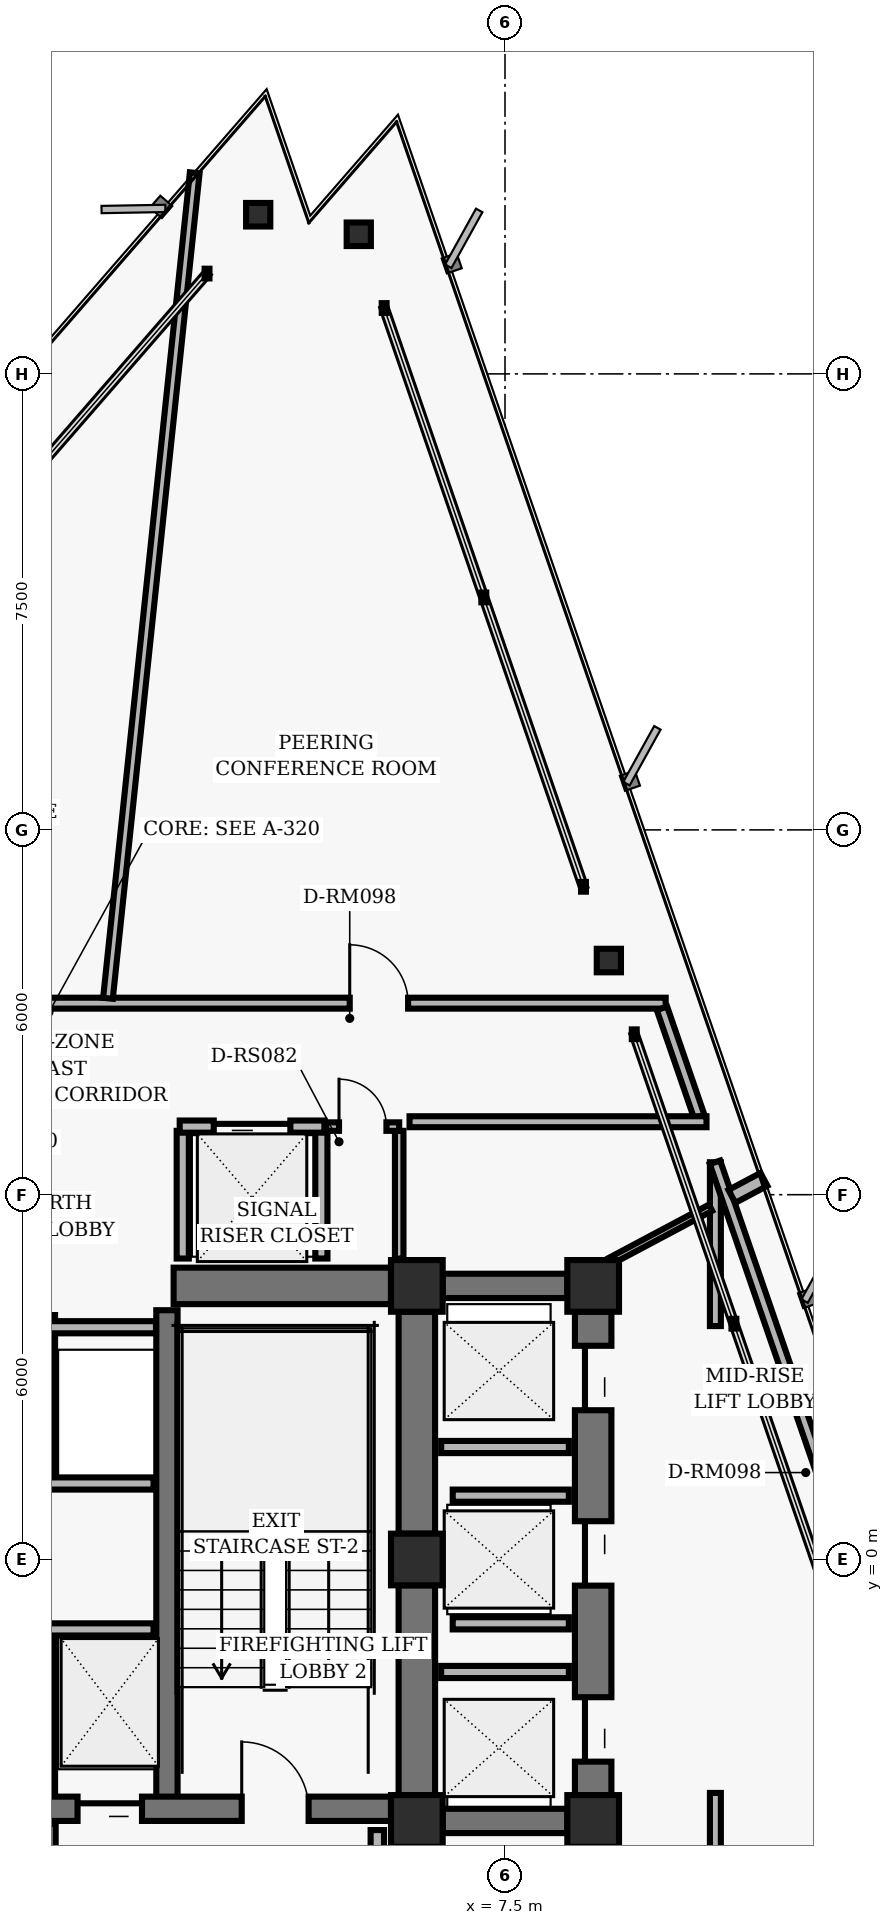
"""IFC4 building model, lengths in metres.
Left out: names, types, materials, properties, quantities, classifications, styles, units other than length and angle.
Written with IfcOpenShell. Run it as: python <this file> out.ifc"""

import sys

from ifc_helpers import new_model, si_unit, direction, frame, frame_2d, origin, origin_2d, place, context, subcontext, project, spatial, rectangle, hollow_rectangle, i_section, extrude, element, fill, save


model = new_model("IFC4")
c1 = context("Model", 3, precision=1e-05, world=origin(), true_north=direction((0.0, 1.0)))
c2 = subcontext(c1, "Body", "Model", "MODEL_VIEW")
j1 = project(units=[si_unit("LENGTHUNIT", "METRE"), si_unit("PLANEANGLEUNIT", "RADIAN")], contexts=[c1])
p1 = place(None, origin())
s1 = spatial("IfcSite", under=j1, at=p1, CompositionType="ELEMENT")
p2 = place(p1, origin())
s2 = spatial("IfcBuilding", under=s1, at=p2, CompositionType="ELEMENT")
p3 = place(p2, frame((0.0, 0.0, 162.4)))
s3 = spatial("IfcBuildingStorey", under=s2, at=p3, CompositionType="ELEMENT", Elevation=162.4)
for number, where, z_axis, x_axis in (
    (1, (6.05, 4.5, 0.0), (0.0, 0.0, 1.0), (1.0, 0.0, 0.0)),
    (2, (6.05, 0.0, 0.0), (0.0, 0.0, 1.0), (1.0, 0.0, 0.0)),
    (3, (6.05, -4.3, 0.0), (0.0, 0.0, 1.0), (1.0, 0.0, 0.0)),
    (4, (8.95, 4.5, 0.0), (0.0, 0.0, 1.0), (1.0, 0.0, 0.0)),
    (5, (8.95, -4.3, 0.0), (0.0, 0.0, 1.0), (1.0, 0.0, 0.0)),
):
    element("IfcColumn", number, at=place(p3, frame(where, z_axis=z_axis, x_axis=x_axis)), inside=s3, PredefinedType="COLUMN", context=c2, shape_type="SweptSolid", body=[
        extrude(hollow_rectangle(XDim=0.85, YDim=0.85, WallThickness=0.055, InnerFilletRadius=0.02, OuterFilletRadius=0.04, at=origin_2d()), origin(), (0.0, 0.0, 1.0), 3.04),
    ])
p4 = place(p3, frame((6.05, 0.425, 0.0), z_axis=(0.0, 0.0, 1.0), x_axis=(0.0, 1.0, 0.0)))
e6 = element("IfcWall", 6, at=p4, inside=s3, PredefinedType="SHEAR", context=c2, shape_type="SweptSolid", body=[
    extrude(rectangle(XDim=3.65, YDim=0.6, at=frame_2d((1.825, 0.0))), origin(), (0.0, 0.0, 1.0), 2.788),
])
p5 = place(p3, frame((6.05, -3.875, 0.0), z_axis=(0.0, 0.0, 1.0), x_axis=(0.0, 1.0, 0.0)))
e7 = element("IfcWall", 7, at=p5, inside=s3, PredefinedType="SHEAR", context=c2, shape_type="SweptSolid", body=[
    extrude(rectangle(XDim=3.45, YDim=0.6, at=frame_2d((1.725, 0.0))), origin(), (0.0, 0.0, 1.0), 2.788),
])
p6 = place(p3, frame((1.94, -4.1, 0.0), z_axis=(0.0, 0.0, 1.0), x_axis=(0.0, 1.0, 0.0)))
e8 = element("IfcWall", 8, at=p6, inside=s3, PredefinedType="SHEAR", context=c2, shape_type="SweptSolid", body=[
    extrude(rectangle(XDim=8.2, YDim=0.35, at=frame_2d((4.1, 0.0))), origin(), (0.0, 0.0, 1.0), 2.788),
])
p7 = place(p3, frame((-5.625, -4.1, 0.0), z_axis=(0.0, 0.0, 1.0), x_axis=(1.0, 0.0, 0.0)))
e9 = element("IfcWall", 9, at=p7, inside=s3, PredefinedType="SHEAR", context=c2, shape_type="SweptSolid", body=[
    extrude(rectangle(XDim=11.25, YDim=0.4, at=frame_2d((5.625, 0.0))), origin(), (0.0, 0.0, 1.0), 2.788),
])
p8 = place(p7, frame((1.355, 0.0, 0.0)))
e10 = element("IfcOpeningElement", 10, at=p8, cuts=e9, PredefinedType="OPENING", context=c2, shape_type="SweptSolid", body=[
    extrude(rectangle(XDim=1.1, YDim=2.04, at=frame_2d((0.55, 1.02))), frame((0.0, 0.21, 0.0), z_axis=(0.0, -1.0, 0.0), x_axis=(1.0, 0.0, 0.0)), (0.0, 0.0, 1.0), 0.42),
])
p9 = place(p7, frame((8.795, 0.0, 0.0)))
e11 = element("IfcOpeningElement", 11, at=p9, cuts=e9, PredefinedType="OPENING", context=c2, shape_type="SweptSolid", body=[
    extrude(rectangle(XDim=1.1, YDim=2.04, at=frame_2d((0.55, 1.02))), frame((0.0, 0.21, 0.0), z_axis=(0.0, -1.0, 0.0), x_axis=(1.0, 0.0, 0.0)), (0.0, 0.0, 1.0), 0.42),
])
p10 = place(p7, frame((4.095, 0.0, 0.0)))
e12 = element("IfcOpeningElement", 12, at=p10, cuts=e9, PredefinedType="OPENING", context=c2, shape_type="SweptSolid", body=[
    extrude(rectangle(XDim=1.06, YDim=2.04, at=frame_2d((0.53, 1.02))), frame((0.0, 0.21, 0.0), z_axis=(0.0, -1.0, 0.0), x_axis=(1.0, 0.0, 0.0)), (0.0, 0.0, 1.0), 0.42),
])
p11 = place(p7, frame((6.095, 0.0, 0.0)))
e13 = element("IfcOpeningElement", 13, at=p11, cuts=e9, PredefinedType="OPENING", context=c2, shape_type="SweptSolid", body=[
    extrude(rectangle(XDim=1.06, YDim=2.04, at=frame_2d((0.53, 1.02))), frame((0.0, 0.21, 0.0), z_axis=(0.0, -1.0, 0.0), x_axis=(1.0, 0.0, 0.0)), (0.0, 0.0, 1.0), 0.42),
])
p12 = place(p3, frame((2.05, 4.5, 0.0), z_axis=(0.0, 0.0, 1.0), x_axis=(1.0, 0.0, 0.0)))
e14 = element("IfcWall", 14, at=p12, inside=s3, PredefinedType="SHEAR", context=c2, shape_type="SweptSolid", body=[
    extrude(rectangle(XDim=3.575, YDim=0.6, at=frame_2d((1.788, 0.0))), origin(), (0.0, 0.0, 1.0), 2.788),
])
p13 = place(p3, frame((8.95, -3.875, 0.0), z_axis=(0.0, 0.0, 1.0), x_axis=(0.0, 1.0, 0.0)))
e15 = element("IfcWall", 15, at=p13, inside=s3, PredefinedType="SHEAR", context=c2, shape_type="SweptSolid", body=[
    extrude(rectangle(XDim=7.95, YDim=0.6, at=frame_2d((3.975, 0.0))), origin(), (0.0, 0.0, 1.0), 2.788),
])
p14 = place(p13, frame((0.55, 0.0, 0.0)))
e16 = element("IfcOpeningElement", 16, at=p14, cuts=e15, PredefinedType="OPENING", context=c2, shape_type="SweptSolid", body=[
    extrude(rectangle(XDim=1.06, YDim=2.04, at=frame_2d((0.53, 1.02))), frame((0.0, 0.31, 0.0), z_axis=(0.0, -1.0, 0.0), x_axis=(1.0, 0.0, 0.0)), (0.0, 0.0, 1.0), 0.62),
])
p15 = place(p13, frame((3.445, 0.0, 0.0)))
e17 = element("IfcOpeningElement", 17, at=p15, cuts=e15, PredefinedType="OPENING", context=c2, shape_type="SweptSolid", body=[
    extrude(rectangle(XDim=1.06, YDim=2.04, at=frame_2d((0.53, 1.02))), frame((0.0, 0.31, 0.0), z_axis=(0.0, -1.0, 0.0), x_axis=(1.0, 0.0, 0.0)), (0.0, 0.0, 1.0), 0.62),
])
p16 = place(p13, frame((6.33, 0.0, 0.0)))
e18 = element("IfcOpeningElement", 18, at=p16, cuts=e15, PredefinedType="OPENING", context=c2, shape_type="SweptSolid", body=[
    extrude(rectangle(XDim=1.06, YDim=2.04, at=frame_2d((0.53, 1.02))), frame((0.0, 0.31, 0.0), z_axis=(0.0, -1.0, 0.0), x_axis=(1.0, 0.0, 0.0)), (0.0, 0.0, 1.0), 0.62),
])
for number, where, z_axis, x_axis in (
    (19, (6.475, 4.5, 0.0), (0.0, 0.0, 1.0), (1.0, 0.0, 0.0)),
    (20, (6.475, -4.3, 0.0), (0.0, 0.0, 1.0), (1.0, 0.0, 0.0)),
):
    element("IfcWall", number, at=place(p3, frame(where, z_axis=z_axis, x_axis=x_axis)), inside=s3, PredefinedType="SHEAR", context=c2, shape_type="SweptSolid", body=[
        extrude(rectangle(XDim=2.05, YDim=0.4, at=frame_2d((1.025, 0.0))), origin(), (0.0, 0.0, 1.0), 2.788),
    ])
for number, where, z_axis, x_axis in (
    (21, (9.208, 9.851, 0.0), (0.0, 0.0, 1.0), (1.0, 0.0, 0.0)),
    (22, (5.095, 21.796, 0.0), (0.0, 0.0, 1.0), (1.0, 0.0, 0.0)),
    (23, (3.441, 22.118, 0.0), (0.0, 0.0, 1.0), (1.0, 0.0, 0.0)),
):
    element("IfcColumn", number, at=place(p3, frame(where, z_axis=z_axis, x_axis=x_axis)), inside=s3, PredefinedType="COLUMN", context=c2, shape_type="SweptSolid", body=[
        extrude(i_section(OverallWidth=0.398, OverallDepth=0.387, WebThickness=0.021, FlangeThickness=0.033, FilletRadius=0.018, at=origin_2d()), origin(), (0.0, 0.0, 1.0), 3.04),
    ])
p17 = place(p3, frame((0.0, -3.82, 0.0), z_axis=(0.0, 0.0, 1.0), x_axis=(0.0, 1.0, 0.0)))
e24 = element("IfcWall", 24, at=p17, inside=s3, PredefinedType="PARTITIONING", context=c2, shape_type="SweptSolid", body=[
    extrude(rectangle(XDim=2.67, YDim=0.2, at=frame_2d((1.335, 0.0))), origin(), (0.0, 0.0, 1.0), 2.763),
])
p18 = place(p3, frame((-1.72, -1.15, 0.0), z_axis=(0.0, 0.0, 1.0), x_axis=(1.0, 0.0, 0.0)))
e25 = element("IfcWall", 25, at=p18, inside=s3, PredefinedType="PARTITIONING", context=c2, shape_type="SweptSolid", body=[
    extrude(rectangle(XDim=3.44, YDim=0.2, at=frame_2d((1.72, 0.0))), origin(), (0.0, 0.0, 1.0), 2.763),
])
p19 = place(p3, frame((5.4, -7.16, 0.0), z_axis=(0.0, 0.0, 1.0), x_axis=(0.0, 1.0, 0.0)))
e26 = element("IfcWall", 26, at=p19, inside=s3, PredefinedType="PARTITIONING", context=c2, shape_type="SweptSolid", body=[
    extrude(rectangle(XDim=2.71, YDim=0.22, at=frame_2d((1.355, 0.0))), origin(), (0.0, 0.0, 1.0), 2.763),
])
p20 = place(p3, frame((0.0, -7.16, 0.0), z_axis=(0.0, 0.0, 1.0), x_axis=(0.0, 1.0, 0.0)))
e27 = element("IfcWall", 27, at=p20, inside=s3, PredefinedType="PARTITIONING", context=c2, shape_type="SweptSolid", body=[
    extrude(rectangle(XDim=2.81, YDim=0.22, at=frame_2d((1.405, 0.0))), origin(), (0.0, 0.0, 1.0), 2.763),
])
p21 = place(p3, frame((0.0, 1.25, 0.0), z_axis=(0.0, 0.0, 1.0), x_axis=(0.0, 1.0, 0.0)))
e28 = element("IfcWall", 28, at=p21, inside=s3, PredefinedType="PARTITIONING", context=c2, shape_type="SweptSolid", body=[
    extrude(rectangle(XDim=2.77, YDim=0.2, at=frame_2d((1.385, 0.0))), origin(), (0.0, 0.0, 1.0), 2.763),
])
p22 = place(p3, frame((-1.72, 1.25, 0.0), z_axis=(0.0, 0.0, 1.0), x_axis=(1.0, 0.0, 0.0)))
e29 = element("IfcWall", 29, at=p22, inside=s3, PredefinedType="PARTITIONING", context=c2, shape_type="SweptSolid", body=[
    extrude(rectangle(XDim=3.44, YDim=0.2, at=frame_2d((1.72, 0.0))), origin(), (0.0, 0.0, 1.0), 2.763),
])
p23 = place(p3, frame((-1.76, 3.82, 0.0), z_axis=(0.0, 0.0, 1.0), x_axis=(1.0, 0.0, 0.0)))
e30 = element("IfcWall", 30, at=p23, inside=s3, PredefinedType="PARTITIONING", context=c2, shape_type="SweptSolid", body=[
    extrude(rectangle(XDim=3.52, YDim=0.2, at=frame_2d((1.76, 0.0))), origin(), (0.0, 0.0, 1.0), 2.763),
])
for number, where, z_axis, x_axis in (
    (31, (2.2, 4.95, 0.0), (0.0, 0.0, 1.0), (0.0, 1.0, 0.0)),
    (32, (4.48, 4.95, 0.0), (0.0, 0.0, 1.0), (0.0, 1.0, 0.0)),
):
    element("IfcWall", number, at=place(p3, frame(where, z_axis=z_axis, x_axis=x_axis)), inside=s3, PredefinedType="PARTITIONING", context=c2, shape_type="SweptSolid", body=[
        extrude(rectangle(XDim=2.1, YDim=0.2, at=frame_2d((1.05, 0.0))), origin(), (0.0, 0.0, 1.0), 2.763),
    ])
p24 = place(p3, frame((2.15, 7.12, 0.0), z_axis=(0.0, 0.0, 1.0), x_axis=(1.0, 0.0, 0.0)))
e33 = element("IfcWall", 33, at=p24, inside=s3, PredefinedType="PARTITIONING", context=c2, shape_type="SweptSolid", body=[
    extrude(rectangle(XDim=2.38, YDim=0.2, at=frame_2d((1.19, 0.0))), origin(), (0.0, 0.0, 1.0), 2.763),
])
p25 = place(p24, frame((0.56, 0.0, 0.0)))
e34 = element("IfcOpeningElement", 34, at=p25, cuts=e33, PredefinedType="OPENING", context=c2, shape_type="SweptSolid", body=[
    extrude(rectangle(XDim=1.26, YDim=2.06, at=frame_2d((0.63, 1.03))), frame((0.0, 0.11, 0.0), z_axis=(0.0, -1.0, 0.0), x_axis=(1.0, 0.0, 0.0)), (0.0, 0.0, 1.0), 0.22),
])
p26 = place(p3, frame((5.76, 4.95, 0.0), z_axis=(0.0, 0.0, 1.0), x_axis=(0.0, 1.0, 0.0)))
e35 = element("IfcWall", 35, at=p26, inside=s3, PredefinedType="PARTITIONING", context=c2, shape_type="SweptSolid", body=[
    extrude(rectangle(XDim=2.1, YDim=0.14, at=frame_2d((1.05, 0.0))), origin(), (0.0, 0.0, 1.0), 2.763),
])
p27 = place(p3, frame((4.56, 7.12, 0.0), z_axis=(0.0, 0.0, 1.0), x_axis=(1.0, 0.0, 0.0)))
e36 = element("IfcWall", 36, at=p27, inside=s3, PredefinedType="PARTITIONING", context=c2, shape_type="SweptSolid", body=[
    extrude(rectangle(XDim=1.2, YDim=0.14, at=frame_2d((0.6, 0.0))), origin(), (0.0, 0.0, 1.0), 2.763),
])
p28 = place(p27, frame((0.21, 0.0, 0.0)))
e37 = element("IfcOpeningElement", 37, at=p28, cuts=e36, PredefinedType="OPENING", context=c2, shape_type="SweptSolid", body=[
    extrude(rectangle(XDim=0.78, YDim=2.01, at=frame_2d((0.39, 1.005))), frame((0.0, 0.08, 0.0), z_axis=(0.0, -1.0, 0.0), x_axis=(1.0, 0.0, 0.0)), (0.0, 0.0, 1.0), 0.16),
])
for number, where, z_axis, x_axis in (
    (38, (6.45, -1.85, 0.0), (0.0, 0.0, 1.0), (1.0, 0.0, 0.0)),
    (39, (6.45, 1.85, 0.0), (0.0, 0.0, 1.0), (1.0, 0.0, 0.0)),
):
    element("IfcWall", number, at=place(p3, frame(where, z_axis=z_axis, x_axis=x_axis)), inside=s3, PredefinedType="PARTITIONING", context=c2, shape_type="SweptSolid", body=[
        extrude(rectangle(XDim=2.1, YDim=0.2, at=frame_2d((1.05, 0.0))), origin(), (0.0, 0.0, 1.0), 2.763),
    ])
for number, where, z_axis, x_axis in (
    (40, (6.64, -1.05, 0.0), (0.0, 0.0, 1.0), (1.0, 0.0, 0.0)),
    (41, (6.64, 1.05, 0.0), (0.0, 0.0, 1.0), (1.0, 0.0, 0.0)),
):
    element("IfcWall", number, at=place(p3, frame(where, z_axis=z_axis, x_axis=x_axis)), inside=s3, PredefinedType="PARTITIONING", context=c2, shape_type="SweptSolid", body=[
        extrude(rectangle(XDim=1.91, YDim=0.2, at=frame_2d((0.955, 0.0))), origin(), (0.0, 0.0, 1.0), 2.763),
    ])
p29 = place(p3, frame((-6.52, 9.15, 0.0), z_axis=(0.0, 0.0, 1.0), x_axis=(1.0, 0.0, 0.0)))
e42 = element("IfcWall", 42, at=p29, inside=s3, PredefinedType="PARTITIONING", context=c2, shape_type="SweptSolid", body=[
    extrude(rectangle(XDim=16.662, YDim=0.18, at=frame_2d((8.331, 0.0))), origin(), (0.0, 0.0, 1.0), 2.763),
])
p30 = place(p29, frame((11.466, 0.0, 0.0)))
e43 = element("IfcOpeningElement", 43, at=p30, cuts=e42, PredefinedType="OPENING", context=c2, shape_type="SweptSolid", body=[
    extrude(rectangle(XDim=0.96, YDim=2.02, at=frame_2d((0.48, 1.01))), frame((0.0, 0.1, 0.0), z_axis=(0.0, -1.0, 0.0), x_axis=(1.0, 0.0, 0.0)), (0.0, 0.0, 1.0), 0.2),
])
p31 = place(p29, frame((3.395, 0.0, 0.0)))
e44 = element("IfcOpeningElement", 44, at=p31, cuts=e42, PredefinedType="OPENING", context=c2, shape_type="SweptSolid", body=[
    extrude(rectangle(XDim=0.96, YDim=2.02, at=frame_2d((0.48, 1.01))), frame((0.0, 0.1, 0.0), z_axis=(0.0, -1.0, 0.0), x_axis=(1.0, 0.0, 0.0)), (0.0, 0.0, 1.0), 0.2),
])
p32 = place(p3, frame((10.082, 9.065, 0.0), z_axis=(0.0, 0.0, 1.0), x_axis=(0.325550958337, -0.945524496524, 0.0)))
e45 = element("IfcWall", 45, at=p32, inside=s3, PredefinedType="PARTITIONING", context=c2, shape_type="SweptSolid", body=[
    extrude(rectangle(XDim=1.882, YDim=0.18, at=frame_2d((0.941, 0.0))), origin(), (0.0, 0.0, 1.0), 2.763),
])
p33 = place(p3, frame((10.814, 7.2, 0.0), z_axis=(0.0, 0.0, 1.0), x_axis=(-1.0, 0.0, 0.0)))
e46 = element("IfcWall", 46, at=p33, inside=s3, PredefinedType="PARTITIONING", context=c2, shape_type="SweptSolid", body=[
    extrude(rectangle(XDim=4.884, YDim=0.18, at=frame_2d((2.442, 0.0))), origin(), (0.0, 0.0, 1.0), 2.763),
])
p34 = place(p3, frame((10.96, -7.11, 0.0), z_axis=(0.0, 0.0, 1.0), x_axis=(0.0, 1.0, 0.0)))
e47 = element("IfcWall", 47, at=p34, inside=s3, PredefinedType="PARTITIONING", context=c2, shape_type="SweptSolid", body=[
    extrude(rectangle(XDim=3.271, YDim=0.18, at=frame_2d((1.635, 0.0))), origin(), (0.0, 0.0, 1.0), 2.763),
])
p35 = place(p3, frame((10.96, 3.84, 0.0), z_axis=(0.0, 0.0, 1.0), x_axis=(0.0, 1.0, 0.0)))
e48 = element("IfcWall", 48, at=p35, inside=s3, PredefinedType="PARTITIONING", context=c2, shape_type="SweptSolid", body=[
    extrude(rectangle(XDim=2.694, YDim=0.18, at=frame_2d((1.347, 0.0))), origin(), (0.0, 0.0, 1.0), 2.33),
])
p36 = place(p3, frame((10.954, 6.533, 0.0), z_axis=(0.0, 0.0, 1.0), x_axis=(0.325553439946, -0.945523642084, 0.0)))
e49 = element("IfcWall", 49, at=p36, inside=s3, PredefinedType="PARTITIONING", context=c2, shape_type="SweptSolid", body=[
    extrude(rectangle(XDim=11.22, YDim=0.18, at=frame_2d((5.61, 0.0))), origin(), (0.0, 0.0, 1.0), 2.763),
])
p37 = place(p36, frame((5.311, 0.0, 0.0)))
e50 = element("IfcOpeningElement", 50, at=p37, cuts=e49, PredefinedType="OPENING", context=c2, shape_type="SweptSolid", body=[
    extrude(rectangle(XDim=0.96, YDim=2.02, at=frame_2d((0.48, 1.01))), frame((0.0, 0.1, 0.0), z_axis=(0.0, -1.0, 0.0), x_axis=(1.0, 0.0, 0.0)), (0.0, 0.0, 1.0), 0.2),
])
p38 = place(p3, frame((9.234, 4.91, 0.0), z_axis=(0.0, 0.0, 1.0), x_axis=(0.882932473202, 0.46949999762, 0.0)))
e51 = element("IfcWall", 51, at=p38, inside=s3, PredefinedType="MOVABLE", context=c2, shape_type="SweptSolid", body=[
    extrude(rectangle(XDim=1.864, YDim=0.115, at=frame_2d((0.932, 0.0))), origin(), (0.0, 0.0, 1.0), 2.763),
])
p39 = place(p3, frame((11.231, 5.972, 0.0), z_axis=(0.0, 0.0, 1.0), x_axis=(0.882951671469, 0.469463891956, 0.0)))
e52 = element("IfcWall", 52, at=p39, inside=s3, PredefinedType="PARTITIONING", context=c2, shape_type="SweptSolid", body=[
    extrude(rectangle(XDim=0.597, YDim=0.24, at=frame_2d((0.299, 0.0))), origin(), (0.0, 0.0, 1.0), 2.763),
])
p40 = place(p3, frame((0.97, 9.23, 0.0), z_axis=(0.0, 0.0, 1.0), x_axis=(0.10452931889, 0.994521805438, 0.0)))
e53 = element("IfcWall", 53, at=p40, inside=s3, PredefinedType="PARTITIONING", context=c2, shape_type="SweptSolid", body=[
    extrude(rectangle(XDim=13.652, YDim=0.16, at=frame_2d((6.826, 0.0))), origin(), (0.0, 0.0, 1.0), 2.763),
])
p41 = place(p9, origin())
e54 = element("IfcDoor", 54, at=p41, inside=s3, OperationType="SINGLE_SWING_LEFT", PredefinedType="DOOR", context=c2, shape_type="SweptSolid", body=[
    extrude(rectangle(XDim=1.1, YDim=2.04, at=frame_2d((0.55, 1.02))), frame((0.0, 0.025, 0.0), z_axis=(0.0, -1.0, 0.0), x_axis=(1.0, 0.0, 0.0)), (0.0, 0.0, 1.0), 0.05),
])
fill(e11, e54)
p42 = place(p11, origin())
e55 = element("IfcDoor", 55, at=p42, inside=s3, OperationType="SLIDING_TO_RIGHT", PredefinedType="DOOR", context=c2, shape_type="SweptSolid", body=[
    extrude(rectangle(XDim=1.06, YDim=2.04, at=frame_2d((0.53, 1.02))), frame((0.0, 0.025, 0.0), z_axis=(0.0, -1.0, 0.0), x_axis=(1.0, 0.0, 0.0)), (0.0, 0.0, 1.0), 0.05),
])
fill(e13, e55)
p43 = place(p25, origin())
e56 = element("IfcDoor", 56, at=p43, inside=s3, OperationType="SLIDING_TO_LEFT", PredefinedType="DOOR", context=c2, shape_type="SweptSolid", body=[
    extrude(rectangle(XDim=1.26, YDim=2.06, at=frame_2d((0.63, 1.03))), frame((0.0, 0.025, 0.0), z_axis=(0.0, -1.0, 0.0), x_axis=(1.0, 0.0, 0.0)), (0.0, 0.0, 1.0), 0.05),
])
fill(e34, e56)
p44 = place(p28, origin())
e57 = element("IfcDoor", 57, at=p44, inside=s3, OperationType="SINGLE_SWING_LEFT", PredefinedType="DOOR", context=c2, shape_type="SweptSolid", body=[
    extrude(rectangle(XDim=0.78, YDim=2.01, at=frame_2d((0.39, 1.005))), frame((0.0, 0.025, 0.0), z_axis=(0.0, -1.0, 0.0), x_axis=(1.0, 0.0, 0.0)), (0.0, 0.0, 1.0), 0.05),
])
fill(e37, e57)
p45 = place(p14, origin())
e58 = element("IfcDoor", 58, at=p45, inside=s3, OperationType="SLIDING_TO_LEFT", PredefinedType="DOOR", context=c2, shape_type="SweptSolid", body=[
    extrude(rectangle(XDim=1.06, YDim=2.04, at=frame_2d((0.53, 1.02))), frame((0.0, 0.025, 0.0), z_axis=(0.0, -1.0, 0.0), x_axis=(1.0, 0.0, 0.0)), (0.0, 0.0, 1.0), 0.05),
])
fill(e16, e58)
p46 = place(p15, origin())
e59 = element("IfcDoor", 59, at=p46, inside=s3, OperationType="SLIDING_TO_RIGHT", PredefinedType="DOOR", context=c2, shape_type="SweptSolid", body=[
    extrude(rectangle(XDim=1.06, YDim=2.04, at=frame_2d((0.53, 1.02))), frame((0.0, 0.025, 0.0), z_axis=(0.0, -1.0, 0.0), x_axis=(1.0, 0.0, 0.0)), (0.0, 0.0, 1.0), 0.05),
])
fill(e17, e59)
p47 = place(p16, origin())
e60 = element("IfcDoor", 60, at=p47, inside=s3, OperationType="SLIDING_TO_LEFT", PredefinedType="DOOR", context=c2, shape_type="SweptSolid", body=[
    extrude(rectangle(XDim=1.06, YDim=2.04, at=frame_2d((0.53, 1.02))), frame((0.0, 0.025, 0.0), z_axis=(0.0, -1.0, 0.0), x_axis=(1.0, 0.0, 0.0)), (0.0, 0.0, 1.0), 0.05),
])
fill(e18, e60)
p48 = place(p30, origin())
e61 = element("IfcDoor", 61, at=p48, inside=s3, OperationType="SINGLE_SWING_LEFT", PredefinedType="DOOR", context=c2, shape_type="SweptSolid", body=[
    extrude(rectangle(XDim=0.96, YDim=2.02, at=frame_2d((0.48, 1.01))), frame((0.0, 0.025, 0.0), z_axis=(0.0, -1.0, 0.0), x_axis=(1.0, 0.0, 0.0)), (0.0, 0.0, 1.0), 0.05),
])
fill(e43, e61)
save(model, sys.argv[1])
